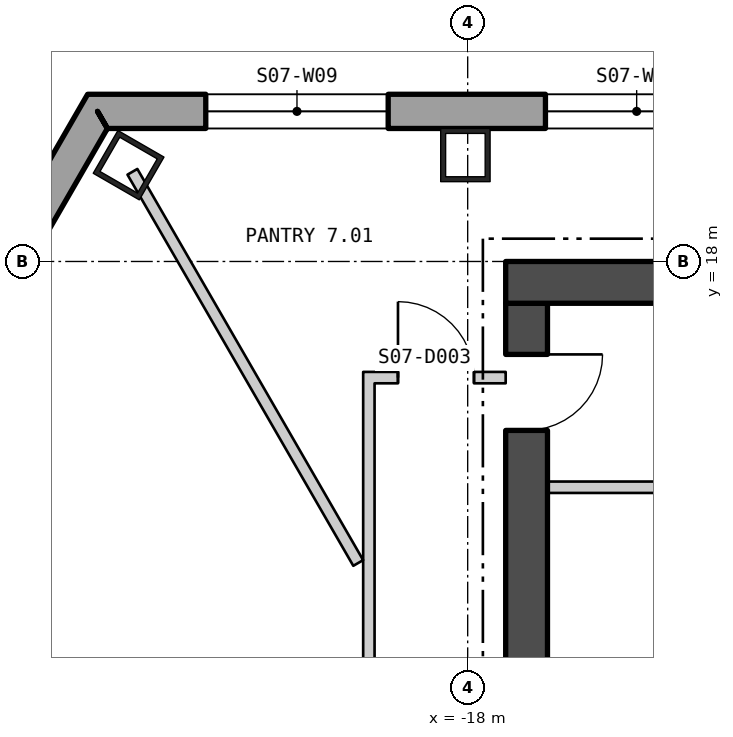
"""IFC4 building model, lengths in metres.
Left out: names, types, materials, properties, quantities, classifications, styles, units other than length and angle.
Written with IfcOpenShell. Run it as: python <this file> out.ifc"""

import sys

from ifc_helpers import new_model, si_unit, direction, frame, frame_2d, origin, origin_2d, place, context, subcontext, project, spatial, polyline, rectangle, hollow_rectangle, outline, extrude, element, fill, save


model = new_model("IFC4")
c1 = context("Model", 3, precision=1e-05, world=origin(), true_north=direction((0.0, 1.0)))
c2 = subcontext(c1, "Body", "Model", "MODEL_VIEW")
j1 = project(units=[si_unit("LENGTHUNIT", "METRE"), si_unit("PLANEANGLEUNIT", "RADIAN")], contexts=[c1])
p1 = place(None, origin())
s1 = spatial("IfcSite", under=j1, at=p1, CompositionType="ELEMENT")
p2 = place(p1, origin())
s2 = spatial("IfcBuilding", under=s1, at=p2, CompositionType="ELEMENT")
p3 = place(p2, frame((0.0, 0.0, 97.8)))
s3 = spatial("IfcBuildingStorey", under=s2, at=p3, CompositionType="ELEMENT", Elevation=97.8)
for number, where, z_axis, x_axis in (
    (1, (-18.03, 19.4, 0.0), (0.0, 0.0, 1.0), (-1.0, 0.0, 0.0)),
    (2, (-22.461, 19.267, 0.0), (0.0, 0.0, 1.0), (-0.5, -0.866, 0.0)),
):
    element("IfcColumn", number, at=place(p3, frame(where, z_axis=z_axis, x_axis=x_axis)), inside=s3, PredefinedType="COLUMN", context=c2, shape_type="SweptSolid", body=[
        extrude(hollow_rectangle(XDim=0.65, YDim=0.7, WallThickness=0.065, at=origin_2d()), origin(), (0.0, 0.0, 1.0), 4.5),
    ])
p4 = place(p3, frame((22.87, 19.975, -0.4), z_axis=(0.0, 0.0, 1.0), x_axis=(-1.0, 0.0, 0.0)))
e3 = element("IfcWall", 3, at=p4, inside=s3, PredefinedType="SOLIDWALL", context=c2, shape_type="SweptSolid", body=[
    extrude(outline(polyline([(-0.13, -0.225), (45.87, -0.225), (45.61, 0.225), (0.13, 0.225), (-0.13, -0.225)])), origin(), (0.0, 0.0, 1.0), 4.5),
])
p5 = place(p4, frame((5.893, 0.0, 1.3)))
e4 = element("IfcOpeningElement", 4, at=p5, cuts=e3, PredefinedType="OPENING", context=c2, shape_type="SweptSolid", body=[
    extrude(rectangle(XDim=2.4, YDim=2.6, at=frame_2d((1.2, 1.3))), frame((0.0, 0.235, 0.0), z_axis=(0.0, -1.0, 0.0), x_axis=(1.0, 0.0, 0.0)), (0.0, 0.0, 1.0), 0.47),
])
p6 = place(p4, frame((10.401, 0.0, 1.3)))
e5 = element("IfcOpeningElement", 5, at=p6, cuts=e3, PredefinedType="OPENING", context=c2, shape_type="SweptSolid", body=[
    extrude(rectangle(XDim=2.4, YDim=2.6, at=frame_2d((1.2, 1.3))), frame((0.0, 0.235, 0.0), z_axis=(0.0, -1.0, 0.0), x_axis=(1.0, 0.0, 0.0)), (0.0, 0.0, 1.0), 0.47),
])
p7 = place(p4, frame((14.909, 0.0, 1.3)))
e6 = element("IfcOpeningElement", 6, at=p7, cuts=e3, PredefinedType="OPENING", context=c2, shape_type="SweptSolid", body=[
    extrude(rectangle(XDim=2.4, YDim=2.6, at=frame_2d((1.2, 1.3))), frame((0.0, 0.235, 0.0), z_axis=(0.0, -1.0, 0.0), x_axis=(1.0, 0.0, 0.0)), (0.0, 0.0, 1.0), 0.47),
])
p8 = place(p4, frame((19.416, 0.0, 1.3)))
e7 = element("IfcOpeningElement", 7, at=p8, cuts=e3, PredefinedType="OPENING", context=c2, shape_type="SweptSolid", body=[
    extrude(rectangle(XDim=2.4, YDim=2.6, at=frame_2d((1.2, 1.3))), frame((0.0, 0.235, 0.0), z_axis=(0.0, -1.0, 0.0), x_axis=(1.0, 0.0, 0.0)), (0.0, 0.0, 1.0), 0.47),
])
p9 = place(p4, frame((23.924, 0.0, 1.3)))
e8 = element("IfcOpeningElement", 8, at=p9, cuts=e3, PredefinedType="OPENING", context=c2, shape_type="SweptSolid", body=[
    extrude(rectangle(XDim=2.4, YDim=2.6, at=frame_2d((1.2, 1.3))), frame((0.0, 0.235, 0.0), z_axis=(0.0, -1.0, 0.0), x_axis=(1.0, 0.0, 0.0)), (0.0, 0.0, 1.0), 0.47),
])
p10 = place(p4, frame((28.431, 0.0, 1.3)))
e9 = element("IfcOpeningElement", 9, at=p10, cuts=e3, PredefinedType="OPENING", context=c2, shape_type="SweptSolid", body=[
    extrude(rectangle(XDim=2.4, YDim=2.6, at=frame_2d((1.2, 1.3))), frame((0.0, 0.235, 0.0), z_axis=(0.0, -1.0, 0.0), x_axis=(1.0, 0.0, 0.0)), (0.0, 0.0, 1.0), 0.47),
])
p11 = place(p4, frame((32.939, 0.0, 1.3)))
e10 = element("IfcOpeningElement", 10, at=p11, cuts=e3, PredefinedType="OPENING", context=c2, shape_type="SweptSolid", body=[
    extrude(rectangle(XDim=2.4, YDim=2.6, at=frame_2d((1.2, 1.3))), frame((0.0, 0.235, 0.0), z_axis=(0.0, -1.0, 0.0), x_axis=(1.0, 0.0, 0.0)), (0.0, 0.0, 1.0), 0.47),
])
p12 = place(p4, frame((37.447, 0.0, 1.3)))
e11 = element("IfcOpeningElement", 11, at=p12, cuts=e3, PredefinedType="OPENING", context=c2, shape_type="SweptSolid", body=[
    extrude(rectangle(XDim=2.4, YDim=2.6, at=frame_2d((1.2, 1.3))), frame((0.0, 0.235, 0.0), z_axis=(0.0, -1.0, 0.0), x_axis=(1.0, 0.0, 0.0)), (0.0, 0.0, 1.0), 0.47),
])
p13 = place(p4, frame((41.916, 0.0, 1.3)))
e12 = element("IfcOpeningElement", 12, at=p13, cuts=e3, PredefinedType="OPENING", context=c2, shape_type="SweptSolid", body=[
    extrude(rectangle(XDim=2.4, YDim=2.6, at=frame_2d((1.2, 1.3))), frame((0.0, 0.235, 0.0), z_axis=(0.0, -1.0, 0.0), x_axis=(1.0, 0.0, 0.0)), (0.0, 0.0, 1.0), 0.47),
])
p14 = place(p3, frame((-22.87, 19.975, -0.4), z_axis=(0.0, 0.0, 1.0), x_axis=(-0.499999223869, -0.866025851883, 0.0)))
e13 = element("IfcWall", 13, at=p14, inside=s3, PredefinedType="SOLIDWALL", context=c2, shape_type="SweptSolid", body=[
    extrude(outline(polyline([(-0.13, -0.225), (9.94, -0.225), (9.68, 0.225), (0.13, 0.225), (-0.13, -0.225)])), origin(), (0.0, 0.0, 1.0), 4.5),
])
p15 = place(p14, frame((1.757, 0.0, 1.3)))
e14 = element("IfcOpeningElement", 14, at=p15, cuts=e13, PredefinedType="OPENING", context=c2, shape_type="SweptSolid", body=[
    extrude(rectangle(XDim=1.8, YDim=2.6, at=frame_2d((0.9, 1.3))), frame((0.0, 0.235, 0.0), z_axis=(0.0, -1.0, 0.0), x_axis=(1.0, 0.0, 0.0)), (0.0, 0.0, 1.0), 0.47),
])
p16 = place(p14, frame((6.253, 0.0, 1.3)))
e15 = element("IfcOpeningElement", 15, at=p16, cuts=e13, PredefinedType="OPENING", context=c2, shape_type="SweptSolid", body=[
    extrude(rectangle(XDim=1.8, YDim=2.6, at=frame_2d((0.9, 1.3))), frame((0.0, 0.235, 0.0), z_axis=(0.0, -1.0, 0.0), x_axis=(1.0, 0.0, 0.0)), (0.0, 0.0, 1.0), 0.47),
])
p17 = place(p3, frame((-17.5, 17.725, 0.0), z_axis=(0.0, 0.0, 1.0), x_axis=(1.0, 0.0, 0.0)))
e16 = element("IfcWall", 16, at=p17, inside=s3, PredefinedType="SHEAR", context=c2, shape_type="SweptSolid", body=[
    extrude(rectangle(XDim=35.0, YDim=0.55, at=frame_2d((17.5, 0.0))), origin(), (0.0, 0.0, 1.0), 4.3),
])
p18 = place(p3, frame((-17.225, 0.55, 0.0), z_axis=(0.0, 0.0, 1.0), x_axis=(0.0, 1.0, 0.0)))
e17 = element("IfcWall", 17, at=p18, inside=s3, PredefinedType="SHEAR", context=c2, shape_type="SweptSolid", body=[
    extrude(rectangle(XDim=16.9, YDim=0.55, at=frame_2d((8.45, 0.0))), origin(), (0.0, 0.0, 1.0), 4.3),
])
p19 = place(p18, frame((5.75, 0.0, 0.0)))
e18 = element("IfcOpeningElement", 18, at=p19, cuts=e17, PredefinedType="OPENING", context=c2, shape_type="SweptSolid", body=[
    extrude(rectangle(XDim=1.5, YDim=2.1, at=frame_2d((0.75, 1.05))), frame((0.0, 0.285, 0.0), z_axis=(0.0, -1.0, 0.0), x_axis=(1.0, 0.0, 0.0)), (0.0, 0.0, 1.0), 0.57),
])
p20 = place(p18, frame((1.23, 0.0, 0.0)))
e19 = element("IfcOpeningElement", 19, at=p20, cuts=e17, PredefinedType="OPENING", context=c2, shape_type="SweptSolid", body=[
    extrude(rectangle(XDim=0.9, YDim=2.1, at=frame_2d((0.45, 1.05))), frame((0.0, 0.285, 0.0), z_axis=(0.0, -1.0, 0.0), x_axis=(1.0, 0.0, 0.0)), (0.0, 0.0, 1.0), 0.57),
])
p21 = place(p18, frame((4.105, 0.0, 0.0)))
e20 = element("IfcOpeningElement", 20, at=p21, cuts=e17, PredefinedType="OPENING", context=c2, shape_type="SweptSolid", body=[
    extrude(rectangle(XDim=0.9, YDim=2.1, at=frame_2d((0.45, 1.05))), frame((0.0, 0.285, 0.0), z_axis=(0.0, -1.0, 0.0), x_axis=(1.0, 0.0, 0.0)), (0.0, 0.0, 1.0), 0.57),
])
p22 = place(p18, frame((10.452, 0.0, 0.0)))
e21 = element("IfcOpeningElement", 21, at=p22, cuts=e17, PredefinedType="OPENING", context=c2, shape_type="SweptSolid", body=[
    extrude(rectangle(XDim=0.9, YDim=2.1, at=frame_2d((0.45, 1.05))), frame((0.0, 0.285, 0.0), z_axis=(0.0, -1.0, 0.0), x_axis=(1.0, 0.0, 0.0)), (0.0, 0.0, 1.0), 0.57),
])
p23 = place(p18, frame((15.227, 0.0, 0.0)))
e22 = element("IfcOpeningElement", 22, at=p23, cuts=e17, PredefinedType="OPENING", context=c2, shape_type="SweptSolid", body=[
    extrude(rectangle(XDim=1.0, YDim=2.1, at=frame_2d((0.5, 1.05))), frame((0.0, 0.285, 0.0), z_axis=(0.0, -1.0, 0.0), x_axis=(1.0, 0.0, 0.0)), (0.0, 0.0, 1.0), 0.57),
])
p24 = place(p3, frame((-16.95, 15.029, 0.0), z_axis=(0.0, 0.0, 1.0), x_axis=(1.0, 0.0, 0.0)))
e23 = element("IfcWall", 23, at=p24, inside=s3, PredefinedType="PARTITIONING", context=c2, shape_type="SweptSolid", body=[
    extrude(rectangle(XDim=2.45, YDim=0.15, at=frame_2d((1.225, 0.0))), origin(), (0.0, 0.0, 1.0), 4.3),
])
p25 = place(p3, frame((-22.411, 19.18, 0.0), z_axis=(0.0, 0.0, 1.0), x_axis=(0.499921522108, -0.866070708276, 0.0)))
e24 = element("IfcWall", 24, at=p25, inside=s3, PredefinedType="PARTITIONING", context=c2, shape_type="SweptSolid", body=[
    extrude(rectangle(XDim=5.943, YDim=0.15, at=frame_2d((2.971, 0.0))), origin(), (0.0, 0.0, 1.0), 4.3),
])
p26 = place(p3, frame((-19.3, -1.875, 0.0), z_axis=(0.0, 0.0, 1.0), x_axis=(0.0, 1.0, 0.0)))
e25 = element("IfcWall", 25, at=p26, inside=s3, PredefinedType="PARTITIONING", context=c2, shape_type="SweptSolid", body=[
    extrude(rectangle(XDim=18.422, YDim=0.15, at=frame_2d((9.211, 0.0))), origin(), (0.0, 0.0, 1.0), 4.3),
])
p27 = place(p26, frame((7.964, 0.0, 0.0)))
e26 = element("IfcOpeningElement", 26, at=p27, cuts=e25, PredefinedType="OPENING", context=c2, shape_type="SweptSolid", body=[
    extrude(rectangle(XDim=1.0, YDim=2.1, at=frame_2d((0.5, 1.05))), frame((0.0, 0.085, 0.0), z_axis=(0.0, -1.0, 0.0), x_axis=(1.0, 0.0, 0.0)), (0.0, 0.0, 1.0), 0.17),
])
p28 = place(p3, frame((-19.225, 16.472, 0.0), z_axis=(0.0, 0.0, 1.0), x_axis=(1.0, 0.0, 0.0)))
e27 = element("IfcWall", 27, at=p28, inside=s3, PredefinedType="PARTITIONING", context=c2, shape_type="SweptSolid", body=[
    extrude(rectangle(XDim=1.725, YDim=0.15, at=frame_2d((0.863, 0.0))), origin(), (0.0, 0.0, 1.0), 4.3),
])
p29 = place(p28, frame((0.308, 0.0, 0.0)))
e28 = element("IfcOpeningElement", 28, at=p29, cuts=e27, PredefinedType="OPENING", context=c2, shape_type="SweptSolid", body=[
    extrude(rectangle(XDim=1.0, YDim=2.1, at=frame_2d((0.5, 1.05))), frame((0.0, 0.085, 0.0), z_axis=(0.0, -1.0, 0.0), x_axis=(1.0, 0.0, 0.0)), (0.0, 0.0, 1.0), 0.17),
])
p30 = place(p12, origin())
e29 = element("IfcWindow", 29, at=p30, inside=s3, PartitioningType="SINGLE_PANEL", PredefinedType="WINDOW", context=c2, shape_type="SweptSolid", body=[
    extrude(rectangle(XDim=2.4, YDim=2.6, at=frame_2d((1.2, 1.3))), frame((0.0, 0.105, 0.0), z_axis=(0.0, -1.0, 0.0), x_axis=(1.0, 0.0, 0.0)), (0.0, 0.0, 1.0), 0.06),
])
fill(e11, e29)
p31 = place(p13, origin())
e30 = element("IfcWindow", 30, at=p31, inside=s3, PartitioningType="SINGLE_PANEL", PredefinedType="WINDOW", context=c2, shape_type="SweptSolid", body=[
    extrude(rectangle(XDim=2.4, YDim=2.6, at=frame_2d((1.2, 1.3))), frame((0.0, 0.105, 0.0), z_axis=(0.0, -1.0, 0.0), x_axis=(1.0, 0.0, 0.0)), (0.0, 0.0, 1.0), 0.06),
])
fill(e12, e30)
p32 = place(p23, origin())
e31 = element("IfcDoor", 31, at=p32, inside=s3, OperationType="SINGLE_SWING_RIGHT", PredefinedType="DOOR", context=c2, shape_type="SweptSolid", body=[
    extrude(rectangle(XDim=1.0, YDim=2.1, at=frame_2d((0.5, 1.05))), frame((0.0, 0.025, 0.0), z_axis=(0.0, -1.0, 0.0), x_axis=(1.0, 0.0, 0.0)), (0.0, 0.0, 1.0), 0.05),
])
fill(e22, e31)
p33 = place(p29, origin())
e32 = element("IfcDoor", 32, at=p33, inside=s3, OperationType="SINGLE_SWING_RIGHT", PredefinedType="DOOR", context=c2, shape_type="SweptSolid", body=[
    extrude(rectangle(XDim=1.0, YDim=2.1, at=frame_2d((0.5, 1.05))), frame((0.0, 0.025, 0.0), z_axis=(0.0, -1.0, 0.0), x_axis=(1.0, 0.0, 0.0)), (0.0, 0.0, 1.0), 0.05),
])
fill(e28, e32)
save(model, sys.argv[1])
